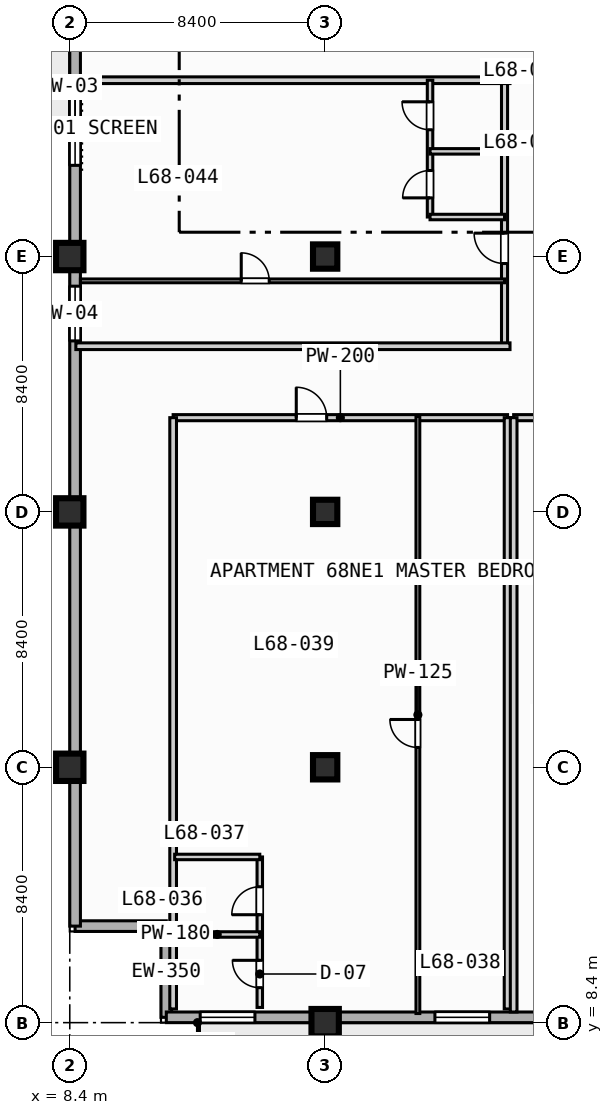
"""IFC4 building model, lengths in metres.
Left out: names, types, materials, properties, quantities, classifications, styles, units other than length and angle.
Written with IfcOpenShell. Run it as: python <this file> out.ifc"""

import sys

from ifc_helpers import new_model, si_unit, direction, frame, frame_2d, origin, origin_2d, place, context, subcontext, project, spatial, rectangle, extrude, element, fill, save


model = new_model("IFC4")
c1 = context("Model", 3, precision=1e-05, world=origin(), true_north=direction((0.0, 1.0)))
c2 = subcontext(c1, "Body", "Model", "MODEL_VIEW")
j1 = project(units=[si_unit("LENGTHUNIT", "METRE"), si_unit("PLANEANGLEUNIT", "RADIAN")], contexts=[c1])
p1 = place(None, origin())
s1 = spatial("IfcSite", under=j1, at=p1, CompositionType="ELEMENT")
p2 = place(p1, origin())
s2 = spatial("IfcBuilding", under=s1, at=p2, CompositionType="ELEMENT")
p3 = place(p2, frame((0.0, 0.0, 274.9)))
s3 = spatial("IfcBuildingStorey", under=s2, at=p3, CompositionType="ELEMENT", Elevation=274.9)
for number, where, z_axis, x_axis in (
    (1, (8.4, 16.8, 0.0), (0.0, 0.0, 1.0), (1.0, 0.0, 0.0)),
    (2, (8.4, 25.2, 0.0), (0.0, 0.0, 1.0), (1.0, 0.0, 0.0)),
    (3, (8.4, 33.6, 0.0), (0.0, 0.0, 1.0), (1.0, 0.0, 0.0)),
    (4, (16.8, 8.4, 0.0), (0.0, 0.0, 1.0), (1.0, 0.0, 0.0)),
):
    element("IfcColumn", number, at=place(p3, frame(where, z_axis=z_axis, x_axis=x_axis)), inside=s3, PredefinedType="COLUMN", context=c2, shape_type="SweptSolid", body=[
        extrude(rectangle(XDim=0.9, YDim=0.9, at=origin_2d()), origin(), (0.0, 0.0, 1.0), 3.7),
    ])
for number, where, z_axis, x_axis in (
    (5, (16.8, 16.8, 0.0), (0.0, 0.0, 1.0), (1.0, 0.0, 0.0)),
    (6, (16.8, 25.2, 0.0), (0.0, 0.0, 1.0), (1.0, 0.0, 0.0)),
    (7, (16.8, 33.6, 0.0), (0.0, 0.0, 1.0), (1.0, 0.0, 0.0)),
):
    element("IfcColumn", number, at=place(p3, frame(where, z_axis=z_axis, x_axis=x_axis)), inside=s3, PredefinedType="COLUMN", context=c2, shape_type="SweptSolid", body=[
        extrude(rectangle(XDim=0.8, YDim=0.8, at=origin_2d()), origin(), (0.0, 0.0, 1.0), 3.7),
    ])
for number, where, z_axis, x_axis in (
    (8, (11.575, 8.575, 0.0), (0.0, 0.0, 1.0), (0.0, 1.0, 0.0)),
    (9, (11.575, 11.575, 0.0), (0.0, 0.0, 1.0), (-1.0, 0.0, 0.0)),
):
    element("IfcWall", number, at=place(p3, frame(where, z_axis=z_axis, x_axis=x_axis)), inside=s3, PredefinedType="STANDARD", context=c2, shape_type="SweptSolid", body=[
        extrude(rectangle(XDim=3.0, YDim=0.35, at=frame_2d((1.5, 0.0))), origin(), (0.0, 0.0, 1.0), 3.47),
    ])
p4 = place(p3, frame((8.575, 11.575, 0.0), z_axis=(0.0, 0.0, 1.0), x_axis=(0.0, 1.0, 0.0)))
e10 = element("IfcWall", 10, at=p4, inside=s3, PredefinedType="STANDARD", context=c2, shape_type="SweptSolid", body=[
    extrude(rectangle(XDim=60.85, YDim=0.35, at=frame_2d((30.425, 0.0))), origin(), (0.0, 0.0, 1.0), 3.47),
])
p5 = place(p4, frame((33.925, 0.0, 0.0)))
e11 = element("IfcOpeningElement", 11, at=p5, cuts=e10, PredefinedType="OPENING", context=c2, shape_type="SweptSolid", body=[
    extrude(rectangle(XDim=1.4, YDim=2.2, at=frame_2d((0.7, 1.1))), frame((0.0, 0.185, 0.0), z_axis=(0.0, -1.0, 0.0), x_axis=(1.0, 0.0, 0.0)), (0.0, 0.0, 1.0), 0.37),
])
p6 = place(p4, frame((25.025, 0.0, 0.85)))
e12 = element("IfcOpeningElement", 12, at=p6, cuts=e10, PredefinedType="OPENING", context=c2, shape_type="SweptSolid", body=[
    extrude(rectangle(XDim=2.4, YDim=1.95, at=frame_2d((1.2, 0.975))), frame((0.0, 0.185, 0.0), z_axis=(0.0, -1.0, 0.0), x_axis=(1.0, 0.0, 0.0)), (0.0, 0.0, 1.0), 0.37),
])
p7 = place(p4, frame((41.825, 0.0, 0.85)))
e13 = element("IfcOpeningElement", 13, at=p7, cuts=e10, PredefinedType="OPENING", context=c2, shape_type="SweptSolid", body=[
    extrude(rectangle(XDim=2.4, YDim=1.95, at=frame_2d((1.2, 0.975))), frame((0.0, 0.185, 0.0), z_axis=(0.0, -1.0, 0.0), x_axis=(1.0, 0.0, 0.0)), (0.0, 0.0, 1.0), 0.37),
])
p8 = place(p4, frame((19.25, 0.0, 0.85)))
e14 = element("IfcOpeningElement", 14, at=p8, cuts=e10, PredefinedType="OPENING", context=c2, shape_type="SweptSolid", body=[
    extrude(rectangle(XDim=1.8, YDim=1.8, at=frame_2d((0.9, 0.9))), frame((0.0, 0.185, 0.0), z_axis=(0.0, -1.0, 0.0), x_axis=(1.0, 0.0, 0.0)), (0.0, 0.0, 1.0), 0.37),
])
p9 = place(p3, frame((72.425, 8.575, 0.0), z_axis=(0.0, 0.0, 1.0), x_axis=(-1.0, 0.0, 0.0)))
e15 = element("IfcWall", 15, at=p9, inside=s3, PredefinedType="STANDARD", context=c2, shape_type="SweptSolid", body=[
    extrude(rectangle(XDim=60.85, YDim=0.35, at=frame_2d((30.425, 0.0))), origin(), (0.0, 0.0, 1.0), 3.47),
])
p10 = place(p9, frame((42.325, 0.0, 0.0)))
e16 = element("IfcOpeningElement", 16, at=p10, cuts=e15, PredefinedType="OPENING", context=c2, shape_type="SweptSolid", body=[
    extrude(rectangle(XDim=1.4, YDim=2.2, at=frame_2d((0.7, 1.1))), frame((0.0, 0.185, 0.0), z_axis=(0.0, -1.0, 0.0), x_axis=(1.0, 0.0, 0.0)), (0.0, 0.0, 1.0), 0.37),
])
p11 = place(p9, frame((33.425, 0.0, 0.85)))
e17 = element("IfcOpeningElement", 17, at=p11, cuts=e15, PredefinedType="OPENING", context=c2, shape_type="SweptSolid", body=[
    extrude(rectangle(XDim=2.4, YDim=1.95, at=frame_2d((1.2, 0.975))), frame((0.0, 0.185, 0.0), z_axis=(0.0, -1.0, 0.0), x_axis=(1.0, 0.0, 0.0)), (0.0, 0.0, 1.0), 0.37),
])
p12 = place(p9, frame((25.325, 0.0, 0.85)))
e18 = element("IfcOpeningElement", 18, at=p12, cuts=e15, PredefinedType="OPENING", context=c2, shape_type="SweptSolid", body=[
    extrude(rectangle(XDim=1.8, YDim=1.8, at=frame_2d((0.9, 0.9))), frame((0.0, 0.185, 0.0), z_axis=(0.0, -1.0, 0.0), x_axis=(1.0, 0.0, 0.0)), (0.0, 0.0, 1.0), 0.37),
])
p13 = place(p9, frame((50.215, 0.0, 0.85)))
e19 = element("IfcOpeningElement", 19, at=p13, cuts=e15, PredefinedType="OPENING", context=c2, shape_type="SweptSolid", body=[
    extrude(rectangle(XDim=1.8, YDim=1.8, at=frame_2d((0.9, 0.9))), frame((0.0, 0.185, 0.0), z_axis=(0.0, -1.0, 0.0), x_axis=(1.0, 0.0, 0.0)), (0.0, 0.0, 1.0), 0.37),
])
p14 = place(p9, frame((57.935, 0.0, 0.85)))
e20 = element("IfcOpeningElement", 20, at=p14, cuts=e15, PredefinedType="OPENING", context=c2, shape_type="SweptSolid", body=[
    extrude(rectangle(XDim=1.8, YDim=1.8, at=frame_2d((0.9, 0.9))), frame((0.0, 0.185, 0.0), z_axis=(0.0, -1.0, 0.0), x_axis=(1.0, 0.0, 0.0)), (0.0, 0.0, 1.0), 0.37),
])
p15 = place(p3, frame((11.8, 28.3, 0.0), z_axis=(0.0, 0.0, 1.0), x_axis=(1.0, 0.0, 0.0)))
e21 = element("IfcWall", 21, at=p15, inside=s3, PredefinedType="PARTITIONING", context=c2, shape_type="SweptSolid", body=[
    extrude(rectangle(XDim=11.0, YDim=0.2, at=frame_2d((5.5, 0.0))), origin(), (0.0, 0.0, 1.0), 3.47),
])
p16 = place(p15, frame((4.05, 0.0, 0.0)))
e22 = element("IfcOpeningElement", 22, at=p16, cuts=e21, PredefinedType="OPENING", context=c2, shape_type="SweptSolid", body=[
    extrude(rectangle(XDim=1.0, YDim=2.15, at=frame_2d((0.5, 1.075))), frame((0.0, 0.11, 0.0), z_axis=(0.0, -1.0, 0.0), x_axis=(1.0, 0.0, 0.0)), (0.0, 0.0, 1.0), 0.22),
])
for number, where, z_axis, x_axis in (
    (23, (22.8, 8.85, 0.0), (0.0, 0.0, 1.0), (0.0, 1.0, 0.0)),
    (24, (11.8, 8.85, 0.0), (0.0, 0.0, 1.0), (0.0, 1.0, 0.0)),
):
    element("IfcWall", number, at=place(p3, frame(where, z_axis=z_axis, x_axis=x_axis)), inside=s3, PredefinedType="PARTITIONING", context=c2, shape_type="SweptSolid", body=[
        extrude(rectangle(XDim=19.45, YDim=0.22, at=frame_2d((9.725, 0.0))), origin(), (0.0, 0.0, 1.0), 3.47),
    ])
p17 = place(p3, frame((14.65, 8.9, 0.0), z_axis=(0.0, 0.0, 1.0), x_axis=(0.0, 1.0, 0.0)))
e25 = element("IfcWall", 25, at=p17, inside=s3, PredefinedType="PLUMBINGWALL", context=c2, shape_type="SweptSolid", body=[
    extrude(rectangle(XDim=4.95, YDim=0.18, at=frame_2d((2.475, 0.0))), origin(), (0.0, 0.0, 1.0), 3.47),
])
p18 = place(p17, frame((0.65, 0.0, 0.0)))
e26 = element("IfcOpeningElement", 26, at=p18, cuts=e25, PredefinedType="OPENING", context=c2, shape_type="SweptSolid", body=[
    extrude(rectangle(XDim=0.9, YDim=2.1, at=frame_2d((0.45, 1.05))), frame((0.0, 0.1, 0.0), z_axis=(0.0, -1.0, 0.0), x_axis=(1.0, 0.0, 0.0)), (0.0, 0.0, 1.0), 0.2),
])
p19 = place(p17, frame((3.05, 0.0, 0.0)))
e27 = element("IfcOpeningElement", 27, at=p19, cuts=e25, PredefinedType="OPENING", context=c2, shape_type="SweptSolid", body=[
    extrude(rectangle(XDim=0.92, YDim=2.1, at=frame_2d((0.46, 1.05))), frame((0.0, 0.1, 0.0), z_axis=(0.0, -1.0, 0.0), x_axis=(1.0, 0.0, 0.0)), (0.0, 0.0, 1.0), 0.2),
])
for number, where, z_axis, x_axis in (
    (28, (11.85, 11.3, 0.0), (0.0, 0.0, 1.0), (1.0, 0.0, 0.0)),
    (29, (11.85, 13.85, 0.0), (0.0, 0.0, 1.0), (1.0, 0.0, 0.0)),
):
    element("IfcWall", number, at=place(p3, frame(where, z_axis=z_axis, x_axis=x_axis)), inside=s3, PredefinedType="PLUMBINGWALL", context=c2, shape_type="SweptSolid", body=[
        extrude(rectangle(XDim=2.8, YDim=0.18, at=frame_2d((1.4, 0.0))), origin(), (0.0, 0.0, 1.0), 3.47),
    ])
p20 = place(p3, frame((19.85, 8.7, 0.0), z_axis=(0.0, 0.0, 1.0), x_axis=(0.0, 1.0, 0.0)))
e30 = element("IfcWall", 30, at=p20, inside=s3, PredefinedType="PARTITIONING", context=c2, shape_type="SweptSolid", body=[
    extrude(rectangle(XDim=19.65, YDim=0.125, at=frame_2d((9.825, 0.0))), origin(), (0.0, 0.0, 1.0), 3.47),
])
p21 = place(p20, frame((8.752, 0.0, 0.0)))
e31 = element("IfcOpeningElement", 31, at=p21, cuts=e30, PredefinedType="OPENING", context=c2, shape_type="SweptSolid", body=[
    extrude(rectangle(XDim=0.92, YDim=2.1, at=frame_2d((0.46, 1.05))), frame((0.0, 0.073, 0.0), z_axis=(0.0, -1.0, 0.0), x_axis=(1.0, 0.0, 0.0)), (0.0, 0.0, 1.0), 0.145),
])
p22 = place(p3, frame((23.0, 28.3, 0.0), z_axis=(0.0, 0.0, 1.0), x_axis=(1.0, 0.0, 0.0)))
e32 = element("IfcWall", 32, at=p22, inside=s3, PredefinedType="PARTITIONING", context=c2, shape_type="SweptSolid", body=[
    extrude(rectangle(XDim=16.2, YDim=0.2, at=frame_2d((8.1, 0.0))), origin(), (0.0, 0.0, 1.0), 3.47),
])
p23 = place(p22, frame((5.5, 0.0, 0.0)))
e33 = element("IfcOpeningElement", 33, at=p23, cuts=e32, PredefinedType="OPENING", context=c2, shape_type="SweptSolid", body=[
    extrude(rectangle(XDim=2.0, YDim=2.15, at=frame_2d((1.0, 1.075))), frame((0.0, 0.11, 0.0), z_axis=(0.0, -1.0, 0.0), x_axis=(1.0, 0.0, 0.0)), (0.0, 0.0, 1.0), 0.22),
])
p24 = place(p3, frame((23.0, 8.75, 0.0), z_axis=(0.0, 0.0, 1.0), x_axis=(0.0, 1.0, 0.0)))
e34 = element("IfcWall", 34, at=p24, inside=s3, PredefinedType="PARTITIONING", context=c2, shape_type="SweptSolid", body=[
    extrude(rectangle(XDim=19.55, YDim=0.22, at=frame_2d((9.775, 0.0))), origin(), (0.0, 0.0, 1.0), 3.47),
])
p25 = place(p3, frame((22.7, 30.65, 0.0), z_axis=(0.0, 0.0, 1.0), x_axis=(0.0, 1.0, 0.0)))
e35 = element("IfcWall", 35, at=p25, inside=s3, PredefinedType="PARTITIONING", context=c2, shape_type="SweptSolid", body=[
    extrude(rectangle(XDim=8.75, YDim=0.2, at=frame_2d((4.375, 0.0))), origin(), (0.0, 0.0, 1.0), 3.47),
])
p26 = place(p25, frame((2.72, 0.0, 0.0)))
e36 = element("IfcOpeningElement", 36, at=p26, cuts=e35, PredefinedType="OPENING", context=c2, shape_type="SweptSolid", body=[
    extrude(rectangle(XDim=1.0, YDim=2.15, at=frame_2d((0.5, 1.075))), frame((0.0, 0.11, 0.0), z_axis=(0.0, -1.0, 0.0), x_axis=(1.0, 0.0, 0.0)), (0.0, 0.0, 1.0), 0.22),
])
for number, where, z_axis, x_axis in (
    (37, (8.6, 30.65, 0.0), (0.0, 0.0, 1.0), (1.0, 0.0, 0.0)),
    (38, (8.6, 39.4, 0.0), (0.0, 0.0, 1.0), (1.0, 0.0, 0.0)),
):
    element("IfcWall", number, at=place(p3, frame(where, z_axis=z_axis, x_axis=x_axis)), inside=s3, PredefinedType="PARTITIONING", context=c2, shape_type="SweptSolid", body=[
        extrude(rectangle(XDim=14.28, YDim=0.22, at=frame_2d((7.14, 0.0))), origin(), (0.0, 0.0, 1.0), 3.47),
    ])
p27 = place(p3, frame((20.25, 34.9, 0.0), z_axis=(0.0, 0.0, 1.0), x_axis=(0.0, 1.0, 0.0)))
e39 = element("IfcWall", 39, at=p27, inside=s3, PredefinedType="PLUMBINGWALL", context=c2, shape_type="SweptSolid", body=[
    extrude(rectangle(XDim=4.5, YDim=0.18, at=frame_2d((2.25, 0.0))), origin(), (0.0, 0.0, 1.0), 3.47),
])
p28 = place(p27, frame((0.63, 0.0, 0.0)))
e40 = element("IfcOpeningElement", 40, at=p28, cuts=e39, PredefinedType="OPENING", context=c2, shape_type="SweptSolid", body=[
    extrude(rectangle(XDim=0.9, YDim=2.1, at=frame_2d((0.45, 1.05))), frame((0.0, 0.1, 0.0), z_axis=(0.0, -1.0, 0.0), x_axis=(1.0, 0.0, 0.0)), (0.0, 0.0, 1.0), 0.2),
])
p29 = place(p27, frame((2.87, 0.0, 0.0)))
e41 = element("IfcOpeningElement", 41, at=p29, cuts=e39, PredefinedType="OPENING", context=c2, shape_type="SweptSolid", body=[
    extrude(rectangle(XDim=0.92, YDim=2.1, at=frame_2d((0.46, 1.05))), frame((0.0, 0.1, 0.0), z_axis=(0.0, -1.0, 0.0), x_axis=(1.0, 0.0, 0.0)), (0.0, 0.0, 1.0), 0.2),
])
for number, where, z_axis, x_axis in (
    (42, (20.25, 34.9, 0.0), (0.0, 0.0, 1.0), (1.0, 0.0, 0.0)),
    (43, (20.25, 37.06, 0.0), (0.0, 0.0, 1.0), (1.0, 0.0, 0.0)),
):
    element("IfcWall", number, at=place(p3, frame(where, z_axis=z_axis, x_axis=x_axis)), inside=s3, PredefinedType="PLUMBINGWALL", context=c2, shape_type="SweptSolid", body=[
        extrude(rectangle(XDim=2.45, YDim=0.18, at=frame_2d((1.225, 0.0))), origin(), (0.0, 0.0, 1.0), 3.47),
    ])
p30 = place(p3, frame((8.75, 32.8, 0.0), z_axis=(0.0, 0.0, 1.0), x_axis=(1.0, 0.0, 0.0)))
e44 = element("IfcWall", 44, at=p30, inside=s3, PredefinedType="PARTITIONING", context=c2, shape_type="SweptSolid", body=[
    extrude(rectangle(XDim=13.95, YDim=0.125, at=frame_2d((6.975, 0.0))), origin(), (0.0, 0.0, 1.0), 3.47),
])
p31 = place(p30, frame((5.29, 0.0, 0.0)))
e45 = element("IfcOpeningElement", 45, at=p31, cuts=e44, PredefinedType="OPENING", context=c2, shape_type="SweptSolid", body=[
    extrude(rectangle(XDim=0.92, YDim=2.1, at=frame_2d((0.46, 1.05))), frame((0.0, 0.073, 0.0), z_axis=(0.0, -1.0, 0.0), x_axis=(1.0, 0.0, 0.0)), (0.0, 0.0, 1.0), 0.145),
])
p32 = place(p6, origin())
e46 = element("IfcWindow", 46, at=p32, inside=s3, PartitioningType="SINGLE_PANEL", PredefinedType="WINDOW", context=c2, shape_type="SweptSolid", body=[
    extrude(rectangle(XDim=2.4, YDim=1.95, at=frame_2d((1.2, 0.975))), frame((0.0, 0.03, 0.0), z_axis=(0.0, -1.0, 0.0), x_axis=(1.0, 0.0, 0.0)), (0.0, 0.0, 1.0), 0.06),
])
fill(e12, e46)
p33 = place(p8, origin())
e47 = element("IfcWindow", 47, at=p33, inside=s3, PartitioningType="SINGLE_PANEL", PredefinedType="WINDOW", context=c2, shape_type="SweptSolid", body=[
    extrude(rectangle(XDim=1.8, YDim=1.8, at=frame_2d((0.9, 0.9))), frame((0.0, 0.03, 0.0), z_axis=(0.0, -1.0, 0.0), x_axis=(1.0, 0.0, 0.0)), (0.0, 0.0, 1.0), 0.06),
])
fill(e14, e47)
p34 = place(p13, origin())
e48 = element("IfcWindow", 48, at=p34, inside=s3, PartitioningType="SINGLE_PANEL", PredefinedType="WINDOW", context=c2, shape_type="SweptSolid", body=[
    extrude(rectangle(XDim=1.8, YDim=1.8, at=frame_2d((0.9, 0.9))), frame((0.0, 0.03, 0.0), z_axis=(0.0, -1.0, 0.0), x_axis=(1.0, 0.0, 0.0)), (0.0, 0.0, 1.0), 0.06),
])
fill(e19, e48)
p35 = place(p14, origin())
e49 = element("IfcWindow", 49, at=p35, inside=s3, PartitioningType="SINGLE_PANEL", PredefinedType="WINDOW", context=c2, shape_type="SweptSolid", body=[
    extrude(rectangle(XDim=1.8, YDim=1.8, at=frame_2d((0.9, 0.9))), frame((0.0, 0.03, 0.0), z_axis=(0.0, -1.0, 0.0), x_axis=(1.0, 0.0, 0.0)), (0.0, 0.0, 1.0), 0.06),
])
fill(e20, e49)
p36 = place(p16, origin())
e50 = element("IfcDoor", 50, at=p36, inside=s3, OperationType="SINGLE_SWING_LEFT", PredefinedType="DOOR", context=c2, shape_type="SweptSolid", body=[
    extrude(rectangle(XDim=1.0, YDim=2.15, at=frame_2d((0.5, 1.075))), frame((0.0, 0.025, 0.0), z_axis=(0.0, -1.0, 0.0), x_axis=(1.0, 0.0, 0.0)), (0.0, 0.0, 1.0), 0.05),
])
fill(e22, e50)
p37 = place(p18, origin())
e51 = element("IfcDoor", 51, at=p37, inside=s3, OperationType="SINGLE_SWING_RIGHT", PredefinedType="DOOR", context=c2, shape_type="SweptSolid", body=[
    extrude(rectangle(XDim=0.9, YDim=2.1, at=frame_2d((0.45, 1.05))), frame((0.0, 0.025, 0.0), z_axis=(0.0, -1.0, 0.0), x_axis=(1.0, 0.0, 0.0)), (0.0, 0.0, 1.0), 0.05),
])
fill(e26, e51)
p38 = place(p19, origin())
e52 = element("IfcDoor", 52, at=p38, inside=s3, OperationType="SINGLE_SWING_LEFT", PredefinedType="DOOR", context=c2, shape_type="SweptSolid", body=[
    extrude(rectangle(XDim=0.92, YDim=2.1, at=frame_2d((0.46, 1.05))), frame((0.0, 0.025, 0.0), z_axis=(0.0, -1.0, 0.0), x_axis=(1.0, 0.0, 0.0)), (0.0, 0.0, 1.0), 0.05),
])
fill(e27, e52)
p39 = place(p21, origin())
e53 = element("IfcDoor", 53, at=p39, inside=s3, OperationType="SINGLE_SWING_RIGHT", PredefinedType="DOOR", context=c2, shape_type="SweptSolid", body=[
    extrude(rectangle(XDim=0.92, YDim=2.1, at=frame_2d((0.46, 1.05))), frame((0.0, 0.025, 0.0), z_axis=(0.0, -1.0, 0.0), x_axis=(1.0, 0.0, 0.0)), (0.0, 0.0, 1.0), 0.05),
])
fill(e31, e53)
p40 = place(p26, origin())
e54 = element("IfcDoor", 54, at=p40, inside=s3, OperationType="SINGLE_SWING_RIGHT", PredefinedType="DOOR", context=c2, shape_type="SweptSolid", body=[
    extrude(rectangle(XDim=1.0, YDim=2.15, at=frame_2d((0.5, 1.075))), frame((0.0, 0.025, 0.0), z_axis=(0.0, -1.0, 0.0), x_axis=(1.0, 0.0, 0.0)), (0.0, 0.0, 1.0), 0.05),
])
fill(e36, e54)
p41 = place(p28, origin())
e55 = element("IfcDoor", 55, at=p41, inside=s3, OperationType="SINGLE_SWING_LEFT", PredefinedType="DOOR", context=c2, shape_type="SweptSolid", body=[
    extrude(rectangle(XDim=0.9, YDim=2.1, at=frame_2d((0.45, 1.05))), frame((0.0, 0.025, 0.0), z_axis=(0.0, -1.0, 0.0), x_axis=(1.0, 0.0, 0.0)), (0.0, 0.0, 1.0), 0.05),
])
fill(e40, e55)
p42 = place(p29, origin())
e56 = element("IfcDoor", 56, at=p42, inside=s3, OperationType="SINGLE_SWING_RIGHT", PredefinedType="DOOR", context=c2, shape_type="SweptSolid", body=[
    extrude(rectangle(XDim=0.92, YDim=2.1, at=frame_2d((0.46, 1.05))), frame((0.0, 0.025, 0.0), z_axis=(0.0, -1.0, 0.0), x_axis=(1.0, 0.0, 0.0)), (0.0, 0.0, 1.0), 0.05),
])
fill(e41, e56)
p43 = place(p31, origin())
e57 = element("IfcDoor", 57, at=p43, inside=s3, OperationType="SINGLE_SWING_LEFT", PredefinedType="DOOR", context=c2, shape_type="SweptSolid", body=[
    extrude(rectangle(XDim=0.92, YDim=2.1, at=frame_2d((0.46, 1.05))), frame((0.0, 0.025, 0.0), z_axis=(0.0, -1.0, 0.0), x_axis=(1.0, 0.0, 0.0)), (0.0, 0.0, 1.0), 0.05),
])
fill(e45, e57)
save(model, sys.argv[1])
